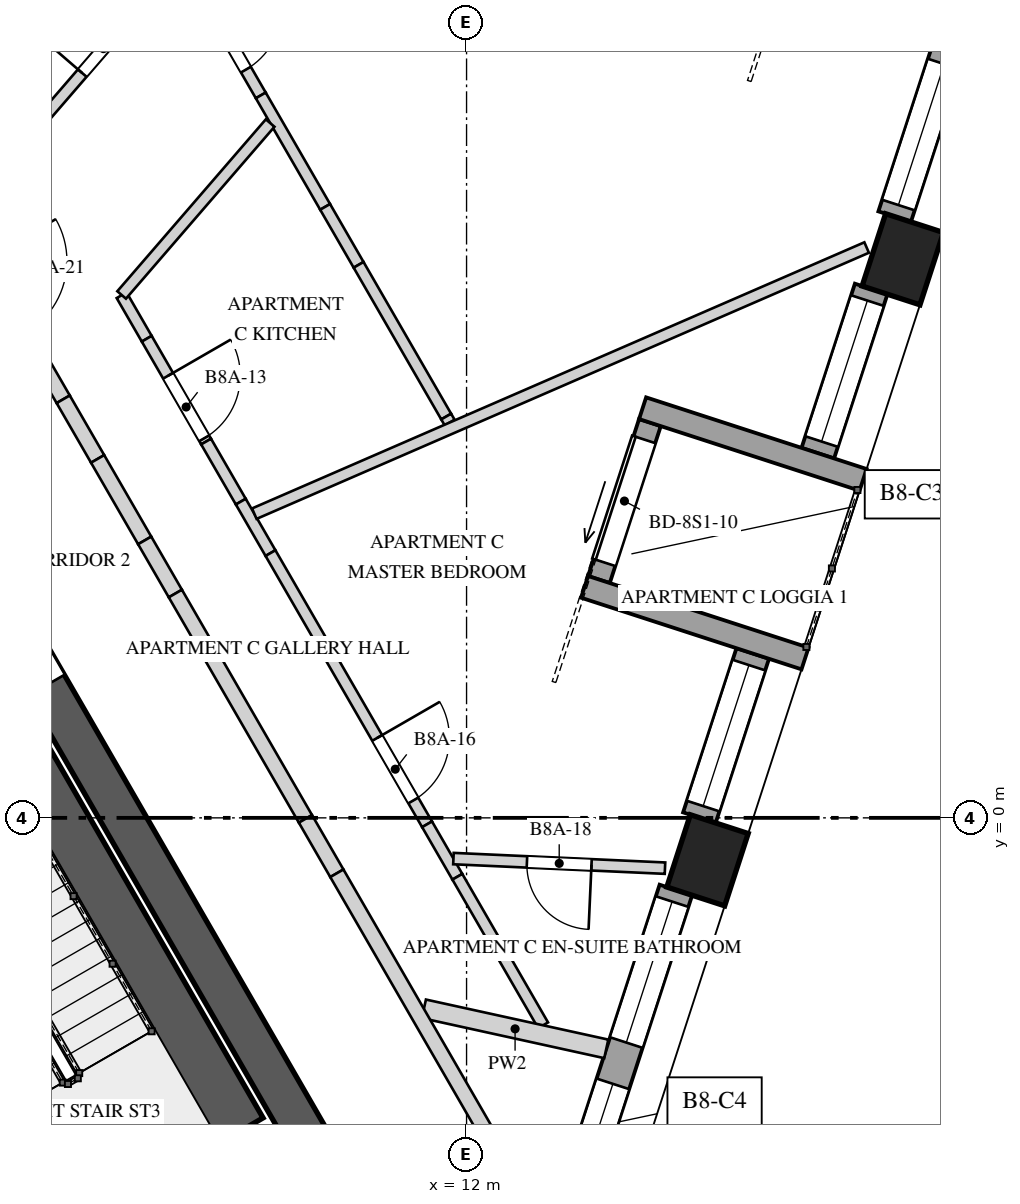
"""IFC4 building model, lengths in metres.
Left out: names, types, materials, properties, quantities, classifications, styles, units other than length and angle.
Written with IfcOpenShell. Run it as: python <this file> out.ifc"""

import sys

from ifc_helpers import new_model, si_unit, direction, frame, frame_2d, origin, origin_2d, place, context, subcontext, project, spatial, polyline, rectangle, outline, extrude, element, fill, save


model = new_model("IFC4")
c1 = context("Model", 3, precision=1e-05, world=origin(), true_north=direction((0.0, 1.0)))
c2 = subcontext(c1, "Body", "Model", "MODEL_VIEW")
j1 = project(units=[si_unit("LENGTHUNIT", "METRE"), si_unit("PLANEANGLEUNIT", "RADIAN")], contexts=[c1])
p1 = place(None, origin())
s1 = spatial("IfcSite", under=j1, at=p1, CompositionType="ELEMENT")
p2 = place(p1, origin())
s2 = spatial("IfcBuilding", under=s1, at=p2, CompositionType="ELEMENT")
p3 = place(p2, frame((0.0, 0.0, 320.4)))
s3 = spatial("IfcBuildingStorey", under=s2, at=p3, CompositionType="ELEMENT", Elevation=320.4)
p4 = place(p3, frame((8.566, -6.613, 0.0), z_axis=(0.0, 0.0, 1.0), x_axis=(0.499995765644, 0.866027848477, 0.0)))
e1 = element("IfcWall", 1, at=p4, inside=s3, PredefinedType="SHEAR", context=c2, shape_type="SweptSolid", body=[
    extrude(rectangle(XDim=2.887, YDim=0.55, at=frame_2d((1.443, 0.0))), origin(), (0.0, 0.0, 1.0), 4.0),
])
p5 = place(p3, frame((9.93, -4.25, 0.0), z_axis=(0.0, 0.0, 1.0), x_axis=(-0.499994590896, 0.86602852671, 0.0)))
e2 = element("IfcWall", 2, at=p5, inside=s3, PredefinedType="SHEAR", context=c2, shape_type="SweptSolid", body=[
    extrude(rectangle(XDim=17.292, YDim=0.55, at=frame_2d((8.646, 0.0))), origin(), (0.0, 0.0, 1.0), 4.0),
])
p6 = place(p5, frame((6.921, 0.0, 0.0)))
e3 = element("IfcOpeningElement", 3, at=p6, cuts=e2, PredefinedType="OPENING", context=c2, shape_type="SweptSolid", body=[
    extrude(rectangle(XDim=1.0, YDim=2.4, at=frame_2d((0.5, 1.2))), frame((0.0, 0.285, 0.0), z_axis=(0.0, -1.0, 0.0), x_axis=(1.0, 0.0, 0.0)), (0.0, 0.0, 1.0), 0.57),
])
for number, where, z_axis, x_axis in (
    (4, (15.17, -0.558, -0.35), (0.0, 0.0, 1.0), (0.309, 0.951, 0.0)),
    (5, (17.739, 7.349, -0.35), (0.0, 0.0, 1.0), (0.309, 0.951, 0.0)),
):
    element("IfcColumn", number, at=place(p3, frame(where, z_axis=z_axis, x_axis=x_axis)), inside=s3, PredefinedType="COLUMN", context=c2, shape_type="SweptSolid", body=[
        extrude(rectangle(XDim=1.0, YDim=0.8, at=origin_2d()), origin(), (0.0, 0.0, 1.0), 4.35),
    ])
p7 = place(p3, frame((12.494, -7.905, 0.0), z_axis=(0.0, 0.0, 1.0), x_axis=(0.309008326872, 0.951059332494, 0.0)))
e6 = element("IfcWall", 6, at=p7, inside=s3, PredefinedType="SOLIDWALL", context=c2, shape_type="SweptSolid", body=[
    extrude(rectangle(XDim=7.314, YDim=0.45, at=frame_2d((3.657, 0.0))), origin(), (0.0, 0.0, 1.0), 3.3),
])
p8 = place(p7, frame((0.161, 0.0, 0.4)))
e7 = element("IfcOpeningElement", 7, at=p8, cuts=e6, PredefinedType="OPENING", context=c2, shape_type="SweptSolid", body=[
    extrude(rectangle(XDim=1.95, YDim=2.75, at=frame_2d((0.975, 1.375))), frame((0.0, 0.235, 0.0), z_axis=(0.0, -1.0, 0.0), x_axis=(1.0, 0.0, 0.0)), (0.0, 0.0, 1.0), 0.47),
])
p9 = place(p7, frame((2.682, 0.0, 0.4)))
e8 = element("IfcOpeningElement", 8, at=p9, cuts=e6, PredefinedType="OPENING", context=c2, shape_type="SweptSolid", body=[
    extrude(rectangle(XDim=1.95, YDim=2.75, at=frame_2d((0.975, 1.375))), frame((0.0, 0.235, 0.0), z_axis=(0.0, -1.0, 0.0), x_axis=(1.0, 0.0, 0.0)), (0.0, 0.0, 1.0), 0.47),
])
p10 = place(p7, frame((5.203, 0.0, 0.4)))
e9 = element("IfcOpeningElement", 9, at=p10, cuts=e6, PredefinedType="OPENING", context=c2, shape_type="SweptSolid", body=[
    extrude(rectangle(XDim=1.95, YDim=2.75, at=frame_2d((0.975, 1.375))), frame((0.0, 0.235, 0.0), z_axis=(0.0, -1.0, 0.0), x_axis=(1.0, 0.0, 0.0)), (0.0, 0.0, 1.0), 0.47),
])
p11 = place(p3, frame((15.063, 0.002, 0.0), z_axis=(0.0, 0.0, 1.0), x_axis=(0.309059334219, 0.951042758204, 0.0)))
e10 = element("IfcWall", 10, at=p11, inside=s3, PredefinedType="SOLIDWALL", context=c2, shape_type="SweptSolid", body=[
    extrude(rectangle(XDim=2.271, YDim=0.45, at=frame_2d((1.135, 0.0))), origin(), (0.0, 0.0, 1.0), 3.3),
])
p12 = place(p11, frame((0.161, 0.0, 0.4)))
e11 = element("IfcOpeningElement", 11, at=p12, cuts=e10, PredefinedType="OPENING", context=c2, shape_type="SweptSolid", body=[
    extrude(rectangle(XDim=1.95, YDim=2.75, at=frame_2d((0.975, 1.375))), frame((0.0, 0.235, 0.0), z_axis=(0.0, -1.0, 0.0), x_axis=(1.0, 0.0, 0.0)), (0.0, 0.0, 1.0), 0.47),
])
p13 = place(p3, frame((16.621, 4.798, 0.0), z_axis=(0.0, 0.0, 1.0), x_axis=(0.309027740273, 0.951053024674, 0.0)))
e12 = element("IfcWall", 12, at=p13, inside=s3, PredefinedType="SOLIDWALL", context=c2, shape_type="SweptSolid", body=[
    extrude(rectangle(XDim=2.271, YDim=0.45, at=frame_2d((1.136, 0.0))), origin(), (0.0, 0.0, 1.0), 3.3),
])
p14 = place(p13, frame((0.161, 0.0, 0.4)))
e13 = element("IfcOpeningElement", 13, at=p14, cuts=e12, PredefinedType="OPENING", context=c2, shape_type="SweptSolid", body=[
    extrude(rectangle(XDim=1.95, YDim=2.1, at=frame_2d((0.975, 1.05))), frame((0.0, 0.235, 0.0), z_axis=(0.0, -1.0, 0.0), x_axis=(1.0, 0.0, 0.0)), (0.0, 0.0, 1.0), 0.47),
])
p15 = place(p3, frame((17.632, 7.909, 0.0), z_axis=(0.0, 0.0, 1.0), x_axis=(0.309027740273, 0.951053024674, 0.0)))
e14 = element("IfcWall", 14, at=p15, inside=s3, PredefinedType="SOLIDWALL", context=c2, shape_type="SweptSolid", body=[
    extrude(rectangle(XDim=2.271, YDim=0.45, at=frame_2d((1.136, 0.0))), origin(), (0.0, 0.0, 1.0), 3.3),
])
p16 = place(p15, frame((0.161, 0.0, 0.4)))
e15 = element("IfcOpeningElement", 15, at=p16, cuts=e14, PredefinedType="OPENING", context=c2, shape_type="SweptSolid", body=[
    extrude(rectangle(XDim=1.95, YDim=2.75, at=frame_2d((0.975, 1.375))), frame((0.0, 0.235, 0.0), z_axis=(0.0, -1.0, 0.0), x_axis=(1.0, 0.0, 0.0)), (0.0, 0.0, 1.0), 0.47),
])
p17 = place(p3, frame((13.741, 3.135, 0.0), z_axis=(0.0, 0.0, 1.0), x_axis=(0.308966581759, 0.95107289487, 0.0)))
e16 = element("IfcWall", 16, at=p17, inside=s3, PredefinedType="SOLIDWALL", context=c2, shape_type="SweptSolid", body=[
    extrude(rectangle(XDim=2.171, YDim=0.3, at=frame_2d((1.086, 0.0))), origin(), (0.0, 0.0, 1.0), 3.3),
])
p18 = place(p17, frame((0.236, 0.0, 0.0)))
e17 = element("IfcOpeningElement", 17, at=p18, cuts=e16, PredefinedType="OPENING", context=c2, shape_type="SweptSolid", body=[
    extrude(rectangle(XDim=1.7, YDim=2.5, at=frame_2d((0.85, 1.25))), frame((0.0, 0.16, 0.0), z_axis=(0.0, -1.0, 0.0), x_axis=(1.0, 0.0, 0.0)), (0.0, 0.0, 1.0), 0.32),
])
for number, where, z_axis, x_axis in (
    (18, (16.453, 2.096, 0.0), (0.0, 0.0, 1.0), (-0.951, 0.309, 0.0)),
    (19, (17.217, 4.447, 0.0), (0.0, 0.0, 1.0), (-0.951, 0.309, 0.0)),
    (20, (19.022, 10.003, 0.0), (0.0, 0.0, 1.0), (-0.951, 0.309, 0.0)),
):
    element("IfcWall", number, at=place(p3, frame(where, z_axis=z_axis, x_axis=x_axis)), inside=s3, PredefinedType="SOLIDWALL", context=c2, shape_type="SweptSolid", body=[
        extrude(rectangle(XDim=3.05, YDim=0.3, at=frame_2d((1.525, 0.0))), origin(), (0.0, 0.0, 1.0), 3.3),
    ])
p19 = place(p3, frame((8.998, -4.135, 0.0), z_axis=(0.0, 0.0, 1.0), x_axis=(-0.500009909098, 0.866019682689, 0.0)))
e21 = element("IfcWall", 21, at=p19, inside=s3, PredefinedType="SOLIDWALL", context=c2, shape_type="SweptSolid", body=[
    extrude(rectangle(XDim=6.2, YDim=0.75, at=frame_2d((3.1, 0.0))), origin(), (0.0, 0.0, 1.0), 3.65),
])
p20 = place(p3, frame((5.7, 10.078, 0.0), z_axis=(0.0, 0.0, 1.0), x_axis=(0.492280407927, 0.870436672005, 0.0)))
e22 = element("IfcWall", 22, at=p20, inside=s3, PredefinedType="PARTITIONING", context=c2, shape_type="SweptSolid", body=[
    extrude(rectangle(XDim=7.246, YDim=0.15, at=frame_2d((3.623, 0.0))), origin(), (0.0, 0.0, 1.0), 2.95),
])
p21 = place(p3, frame((6.246, 8.99, 0.0), z_axis=(0.0, 0.0, 1.0), x_axis=(0.653775215384, 0.756688818306, 0.0)))
e23 = element("IfcWall", 23, at=p21, inside=s3, PredefinedType="PARTITIONING", context=c2, shape_type="SweptSolid", body=[
    extrude(rectangle(XDim=2.987, YDim=0.15, at=frame_2d((1.493, 0.0))), origin(), (0.0, 0.0, 1.0), 3.65),
])
p22 = place(p21, frame((1.068, 0.0, 0.0)))
e24 = element("IfcOpeningElement", 24, at=p22, cuts=e23, PredefinedType="OPENING", context=c2, shape_type="SweptSolid", body=[
    extrude(rectangle(XDim=0.85, YDim=2.4, at=frame_2d((0.425, 1.2))), frame((0.0, 0.085, 0.0), z_axis=(0.0, -1.0, 0.0), x_axis=(1.0, 0.0, 0.0)), (0.0, 0.0, 1.0), 0.17),
])
p23 = place(p3, frame((8.597, 10.71, 0.0), z_axis=(0.0, 0.0, 1.0), x_axis=(0.499950230578, -0.866054136267, 0.0)))
e25 = element("IfcWall", 25, at=p23, inside=s3, PredefinedType="PARTITIONING", context=c2, shape_type="SweptSolid", body=[
    extrude(outline(polyline([(0.0, 0.0), (1.392, 0.0), (1.392, 2.55), (0.474, 2.55), (0.474, 3.65), (0.0, 3.65), (0.0, 0.0)])), frame((0.0, 0.075, 0.0), z_axis=(0.0, -1.0, 0.0), x_axis=(1.0, 0.0, 0.0)), (0.0, 0.0, 1.0), 0.15),
])
p24 = place(p23, frame((0.05, 0.0, 0.0)))
e26 = element("IfcOpeningElement", 26, at=p24, cuts=e25, PredefinedType="OPENING", context=c2, shape_type="SweptSolid", body=[
    extrude(rectangle(XDim=0.95, YDim=2.4, at=frame_2d((0.475, 1.2))), frame((0.0, 0.085, 0.0), z_axis=(0.0, -1.0, 0.0), x_axis=(1.0, 0.0, 0.0)), (0.0, 0.0, 1.0), 0.17),
])
p25 = place(p3, frame((9.293, 9.504, 0.0), z_axis=(0.0, 0.0, 1.0), x_axis=(0.500046963369, -0.865998287773, 0.0)))
e27 = element("IfcWall", 27, at=p25, inside=s3, PredefinedType="PARTITIONING", context=c2, shape_type="SweptSolid", body=[
    extrude(rectangle(XDim=1.693, YDim=0.15, at=frame_2d((0.847, 0.0))), origin(), (0.0, 0.0, 1.0), 3.65),
])
p26 = place(p3, frame((10.139, 8.038, 0.0), z_axis=(0.0, 0.0, 1.0), x_axis=(0.499866452165, -0.866102493935, 0.0)))
e28 = element("IfcWall", 28, at=p26, inside=s3, PredefinedType="PARTITIONING", context=c2, shape_type="SweptSolid", body=[
    extrude(rectangle(XDim=0.881, YDim=0.15, at=frame_2d((0.44, 0.0))), origin(), (0.0, 0.0, 1.0), 2.55),
])
p27 = place(p3, frame((10.58, 7.275, 0.0), z_axis=(0.0, 0.0, 1.0), x_axis=(0.500012835235, -0.866017993231, 0.0)))
e29 = element("IfcWall", 29, at=p27, inside=s3, PredefinedType="PARTITIONING", context=c2, shape_type="SweptSolid", body=[
    extrude(rectangle(XDim=2.305, YDim=0.15, at=frame_2d((1.152, 0.0))), origin(), (0.0, 0.0, 1.0), 3.65),
])
p28 = place(p3, frame((11.732, 5.28, 0.0), z_axis=(0.0, 0.0, 1.0), x_axis=(0.501036270542, -0.865426285481, 0.0)))
e30 = element("IfcWall", 30, at=p28, inside=s3, PredefinedType="PARTITIONING", context=c2, shape_type="SweptSolid", body=[
    extrude(rectangle(XDim=0.091, YDim=0.15, at=frame_2d((0.045, 0.0))), origin(), (0.0, 0.0, 1.0), 2.75),
])
p29 = place(p3, frame((7.462, 6.876, 0.0), z_axis=(0.0, 0.0, 1.0), x_axis=(0.499914360624, -0.866074842056, 0.0)))
e31 = element("IfcWall", 31, at=p29, inside=s3, PredefinedType="PARTITIONING", context=c2, shape_type="SweptSolid", body=[
    extrude(rectangle(XDim=0.661, YDim=0.15, at=frame_2d((0.33, 0.0))), origin(), (0.0, 0.0, 1.0), 3.65),
])
p30 = place(p3, frame((7.792, 6.303, 0.0), z_axis=(0.0, 0.0, 1.0), x_axis=(0.50003806587, -0.866003425329, 0.0)))
e32 = element("IfcWall", 32, at=p30, inside=s3, PredefinedType="PARTITIONING", context=c2, shape_type="SweptSolid", body=[
    extrude(outline(polyline([(0.0, 0.0), (1.562, 0.0), (1.562, 3.65), (0.881, 3.65), (0.881, 2.55), (0.0, 2.55), (0.0, 0.0)])), frame((0.0, 0.075, 0.0), z_axis=(0.0, -1.0, 0.0), x_axis=(1.0, 0.0, 0.0)), (0.0, 0.0, 1.0), 0.15),
])
p31 = place(p30, frame((0.562, 0.0, 0.0)))
e33 = element("IfcOpeningElement", 33, at=p31, cuts=e32, PredefinedType="OPENING", context=c2, shape_type="SweptSolid", body=[
    extrude(rectangle(XDim=0.95, YDim=2.4, at=frame_2d((0.475, 1.2))), frame((0.0, 0.085, 0.0), z_axis=(0.0, -1.0, 0.0), x_axis=(1.0, 0.0, 0.0)), (0.0, 0.0, 1.0), 0.17),
])
p32 = place(p3, frame((8.573, 4.95, 0.0), z_axis=(0.0, 0.0, 1.0), x_axis=(0.500023511883, -0.866011828767, 0.0)))
e34 = element("IfcWall", 34, at=p32, inside=s3, PredefinedType="PARTITIONING", context=c2, shape_type="SweptSolid", body=[
    extrude(rectangle(XDim=0.913, YDim=0.15, at=frame_2d((0.456, 0.0))), origin(), (0.0, 0.0, 1.0), 3.65),
])
p33 = place(p3, frame((9.03, 4.16, 0.0), z_axis=(0.0, 0.0, 1.0), x_axis=(0.499767520639, -0.866159584207, 0.0)))
e35 = element("IfcWall", 35, at=p33, inside=s3, PredefinedType="PARTITIONING", context=c2, shape_type="SweptSolid", body=[
    extrude(rectangle(XDim=0.781, YDim=0.15, at=frame_2d((0.391, 0.0))), origin(), (0.0, 0.0, 1.0), 2.75),
])
p34 = place(p3, frame((9.42, 3.483, 0.0), z_axis=(0.0, 0.0, 1.0), x_axis=(0.50002680699, -0.866009926209, 0.0)))
e36 = element("IfcWall", 36, at=p34, inside=s3, PredefinedType="PARTITIONING", context=c2, shape_type="SweptSolid", body=[
    extrude(rectangle(XDim=4.12, YDim=0.15, at=frame_2d((2.06, 0.0))), origin(), (0.0, 0.0, 1.0), 3.65),
])
p35 = place(p34, frame((2.808, 0.0, 0.0)))
e37 = element("IfcOpeningElement", 37, at=p35, cuts=e36, PredefinedType="OPENING", context=c2, shape_type="SweptSolid", body=[
    extrude(rectangle(XDim=0.95, YDim=2.4, at=frame_2d((0.475, 1.2))), frame((0.0, 0.085, 0.0), z_axis=(0.0, -1.0, 0.0), x_axis=(1.0, 0.0, 0.0)), (0.0, 0.0, 1.0), 0.17),
])
p36 = place(p3, frame((11.48, -0.085, 0.0), z_axis=(0.0, 0.0, 1.0), x_axis=(0.499961121316, -0.86604784924, 0.0)))
e38 = element("IfcWall", 38, at=p36, inside=s3, PredefinedType="PARTITIONING", context=c2, shape_type="SweptSolid", body=[
    extrude(rectangle(XDim=0.797, YDim=0.15, at=frame_2d((0.398, 0.0))), origin(), (0.0, 0.0, 1.0), 2.95),
])
p37 = place(p3, frame((11.879, -0.775, 0.0), z_axis=(0.0, 0.0, 1.0), x_axis=(0.50003780229, -0.866003577522, 0.0)))
e39 = element("IfcWall", 39, at=p37, inside=s3, PredefinedType="PARTITIONING", context=c2, shape_type="SweptSolid", body=[
    extrude(rectangle(XDim=2.256, YDim=0.15, at=frame_2d((1.128, 0.0))), origin(), (0.0, 0.0, 1.0), 3.65),
])
p38 = place(p3, frame((9.416, 9.141, 0.0), z_axis=(0.0, 0.0, 1.0), x_axis=(-0.653726199584, -0.756731164931, 0.0)))
e40 = element("IfcWall", 40, at=p38, inside=s3, PredefinedType="PARTITIONING", context=c2, shape_type="SweptSolid", body=[
    extrude(rectangle(XDim=2.989, YDim=0.15, at=frame_2d((1.494, 0.0))), origin(), (0.0, 0.0, 1.0), 3.65),
])
p39 = place(p3, frame((11.439, -2.512, 0.0), z_axis=(0.0, 0.0, 1.0), x_axis=(0.976726571075, -0.2144882406, 0.0)))
e41 = element("IfcWall", 41, at=p39, inside=s3, PredefinedType="SOLIDWALL", context=c2, shape_type="SweptSolid", body=[
    extrude(rectangle(XDim=2.456, YDim=0.25, at=frame_2d((1.228, 0.0))), origin(), (0.0, 0.0, 1.0), 3.65),
])
p40 = place(p3, frame((14.611, -0.662, 0.0), z_axis=(0.0, 0.0, 1.0), x_axis=(-0.998973232514, 0.045304312387, 0.0)))
e42 = element("IfcWall", 42, at=p40, inside=s3, PredefinedType="PARTITIONING", context=c2, shape_type="SweptSolid", body=[
    extrude(rectangle(XDim=2.786, YDim=0.15, at=frame_2d((1.393, 0.0))), origin(), (0.0, 0.0, 1.0), 2.95),
])
p41 = place(p40, frame((0.968, 0.0, 0.0)))
e43 = element("IfcOpeningElement", 43, at=p41, cuts=e42, PredefinedType="OPENING", context=c2, shape_type="SweptSolid", body=[
    extrude(rectangle(XDim=0.85, YDim=2.4, at=frame_2d((0.425, 1.2))), frame((0.0, 0.085, 0.0), z_axis=(0.0, -1.0, 0.0), x_axis=(1.0, 0.0, 0.0)), (0.0, 0.0, 1.0), 0.17),
])
p42 = place(p3, frame((17.263, 7.503, 0.0), z_axis=(0.0, 0.0, 1.0), x_axis=(-0.917126165883, -0.398597034425, 0.0)))
e44 = element("IfcWall", 44, at=p42, inside=s3, PredefinedType="PARTITIONING", context=c2, shape_type="SweptSolid", body=[
    extrude(rectangle(XDim=8.784, YDim=0.15, at=frame_2d((4.392, 0.0))), origin(), (0.0, 0.0, 1.0), 2.75),
])
p43 = place(p3, frame((6.29, 6.205, 0.0), z_axis=(0.0, 0.0, 1.0), x_axis=(0.500045602705, -0.86599907345, 0.0)))
e45 = element("IfcWall", 45, at=p43, inside=s3, PredefinedType="SOLIDWALL", context=c2, shape_type="SweptSolid", body=[
    extrude(rectangle(XDim=0.807, YDim=0.2, at=frame_2d((0.403, 0.0))), origin(), (0.0, 0.0, 1.0), 3.65),
])
p44 = place(p3, frame((6.693, 5.507, 0.0), z_axis=(0.0, 0.0, 1.0), x_axis=(0.499994660107, -0.866028486751, 0.0)))
e46 = element("IfcWall", 46, at=p44, inside=s3, PredefinedType="SOLIDWALL", context=c2, shape_type="SweptSolid", body=[
    extrude(rectangle(XDim=0.906, YDim=0.2, at=frame_2d((0.453, 0.0))), origin(), (0.0, 0.0, 1.0), 2.55),
])
p45 = place(p3, frame((7.146, 4.722, 0.0), z_axis=(0.0, 0.0, 1.0), x_axis=(0.499955681623, -0.866050989499, 0.0)))
e47 = element("IfcWall", 47, at=p45, inside=s3, PredefinedType="SOLIDWALL", context=c2, shape_type="SweptSolid", body=[
    extrude(rectangle(XDim=1.238, YDim=0.2, at=frame_2d((0.619, 0.0))), origin(), (0.0, 0.0, 1.0), 3.65),
])
p46 = place(p3, frame((7.765, 3.65, 0.0), z_axis=(0.0, 0.0, 1.0), x_axis=(0.500141487433, -0.865943700565, 0.0)))
e48 = element("IfcWall", 48, at=p46, inside=s3, PredefinedType="SOLIDWALL", context=c2, shape_type="SweptSolid", body=[
    extrude(rectangle(XDim=0.807, YDim=0.2, at=frame_2d((0.403, 0.0))), origin(), (0.0, 0.0, 1.0), 2.75),
])
p47 = place(p3, frame((8.169, 2.951, 0.0), z_axis=(0.0, 0.0, 1.0), x_axis=(0.499959115548, -0.866049007147, 0.0)))
e49 = element("IfcWall", 49, at=p47, inside=s3, PredefinedType="SOLIDWALL", context=c2, shape_type="SweptSolid", body=[
    extrude(rectangle(XDim=3.423, YDim=0.2, at=frame_2d((1.711, 0.0))), origin(), (0.0, 0.0, 1.0), 3.65),
])
p48 = place(p3, frame((9.88, -0.013, 0.0), z_axis=(0.0, 0.0, 1.0), x_axis=(0.499952654668, -0.866052736899, 0.0)))
e50 = element("IfcWall", 50, at=p48, inside=s3, PredefinedType="SOLIDWALL", context=c2, shape_type="SweptSolid", body=[
    extrude(rectangle(XDim=0.826, YDim=0.2, at=frame_2d((0.413, 0.0))), origin(), (0.0, 0.0, 1.0), 2.95),
])
p49 = place(p3, frame((10.293, -0.729, 0.0), z_axis=(0.0, 0.0, 1.0), x_axis=(0.50002046505, -0.86601358796, 0.0)))
e51 = element("IfcWall", 51, at=p49, inside=s3, PredefinedType="SOLIDWALL", context=c2, shape_type="SweptSolid", body=[
    extrude(rectangle(XDim=4.066, YDim=0.2, at=frame_2d((2.033, 0.0))), origin(), (0.0, 0.0, 1.0), 3.65),
])
p50 = place(p9, origin())
e52 = element("IfcWindow", 52, at=p50, inside=s3, PartitioningType="SINGLE_PANEL", PredefinedType="WINDOW", context=c2, shape_type="SweptSolid", body=[
    extrude(rectangle(XDim=1.95, YDim=2.75, at=frame_2d((0.975, 1.375))), frame((0.0, 0.03, 0.0), z_axis=(0.0, -1.0, 0.0), x_axis=(1.0, 0.0, 0.0)), (0.0, 0.0, 1.0), 0.06),
])
fill(e8, e52)
p51 = place(p10, origin())
e53 = element("IfcWindow", 53, at=p51, inside=s3, PartitioningType="SINGLE_PANEL", PredefinedType="WINDOW", context=c2, shape_type="SweptSolid", body=[
    extrude(rectangle(XDim=1.95, YDim=2.75, at=frame_2d((0.975, 1.375))), frame((0.0, 0.03, 0.0), z_axis=(0.0, -1.0, 0.0), x_axis=(1.0, 0.0, 0.0)), (0.0, 0.0, 1.0), 0.06),
])
fill(e9, e53)
p52 = place(p12, origin())
e54 = element("IfcWindow", 54, at=p52, inside=s3, PartitioningType="SINGLE_PANEL", PredefinedType="WINDOW", context=c2, shape_type="SweptSolid", body=[
    extrude(rectangle(XDim=1.95, YDim=2.75, at=frame_2d((0.975, 1.375))), frame((0.0, 0.03, 0.0), z_axis=(0.0, -1.0, 0.0), x_axis=(1.0, 0.0, 0.0)), (0.0, 0.0, 1.0), 0.06),
])
fill(e11, e54)
p53 = place(p14, origin())
e55 = element("IfcWindow", 55, at=p53, inside=s3, PartitioningType="SINGLE_PANEL", PredefinedType="WINDOW", context=c2, shape_type="SweptSolid", body=[
    extrude(rectangle(XDim=1.95, YDim=2.1, at=frame_2d((0.975, 1.05))), frame((0.0, 0.03, 0.0), z_axis=(0.0, -1.0, 0.0), x_axis=(1.0, 0.0, 0.0)), (0.0, 0.0, 1.0), 0.06),
])
fill(e13, e55)
p54 = place(p16, origin())
e56 = element("IfcWindow", 56, at=p54, inside=s3, PartitioningType="SINGLE_PANEL", PredefinedType="WINDOW", context=c2, shape_type="SweptSolid", body=[
    extrude(rectangle(XDim=1.95, YDim=2.75, at=frame_2d((0.975, 1.375))), frame((0.0, 0.03, 0.0), z_axis=(0.0, -1.0, 0.0), x_axis=(1.0, 0.0, 0.0)), (0.0, 0.0, 1.0), 0.06),
])
fill(e15, e56)
p55 = place(p18, origin())
e57 = element("IfcDoor", 57, at=p55, inside=s3, OperationType="SLIDING_TO_LEFT", PredefinedType="DOOR", context=c2, shape_type="SweptSolid", body=[
    extrude(rectangle(XDim=1.7, YDim=2.5, at=frame_2d((0.85, 1.25))), frame((0.0, 0.025, 0.0), z_axis=(0.0, -1.0, 0.0), x_axis=(1.0, 0.0, 0.0)), (0.0, 0.0, 1.0), 0.05),
])
fill(e17, e57)
p56 = place(p31, origin())
e58 = element("IfcDoor", 58, at=p56, inside=s3, OperationType="SINGLE_SWING_LEFT", PredefinedType="DOOR", context=c2, shape_type="SweptSolid", body=[
    extrude(rectangle(XDim=0.95, YDim=2.4, at=frame_2d((0.475, 1.2))), frame((0.0, 0.025, 0.0), z_axis=(0.0, -1.0, 0.0), x_axis=(1.0, 0.0, 0.0)), (0.0, 0.0, 1.0), 0.05),
])
fill(e33, e58)
p57 = place(p22, origin())
e59 = element("IfcDoor", 59, at=p57, inside=s3, OperationType="SINGLE_SWING_RIGHT", PredefinedType="DOOR", context=c2, shape_type="SweptSolid", body=[
    extrude(rectangle(XDim=0.85, YDim=2.4, at=frame_2d((0.425, 1.2))), frame((0.0, 0.025, 0.0), z_axis=(0.0, -1.0, 0.0), x_axis=(1.0, 0.0, 0.0)), (0.0, 0.0, 1.0), 0.05),
])
fill(e24, e59)
p58 = place(p24, origin())
e60 = element("IfcDoor", 60, at=p58, inside=s3, OperationType="SINGLE_SWING_LEFT", PredefinedType="DOOR", context=c2, shape_type="SweptSolid", body=[
    extrude(rectangle(XDim=0.95, YDim=2.4, at=frame_2d((0.475, 1.2))), frame((0.0, 0.025, 0.0), z_axis=(0.0, -1.0, 0.0), x_axis=(1.0, 0.0, 0.0)), (0.0, 0.0, 1.0), 0.05),
])
fill(e26, e60)
p59 = place(p35, origin())
e61 = element("IfcDoor", 61, at=p59, inside=s3, OperationType="SINGLE_SWING_RIGHT", PredefinedType="DOOR", context=c2, shape_type="SweptSolid", body=[
    extrude(rectangle(XDim=0.95, YDim=2.4, at=frame_2d((0.475, 1.2))), frame((0.0, 0.025, 0.0), z_axis=(0.0, -1.0, 0.0), x_axis=(1.0, 0.0, 0.0)), (0.0, 0.0, 1.0), 0.05),
])
fill(e37, e61)
p60 = place(p41, origin())
e62 = element("IfcDoor", 62, at=p60, inside=s3, OperationType="SINGLE_SWING_RIGHT", PredefinedType="DOOR", context=c2, shape_type="SweptSolid", body=[
    extrude(rectangle(XDim=0.85, YDim=2.4, at=frame_2d((0.425, 1.2))), frame((0.0, 0.025, 0.0), z_axis=(0.0, -1.0, 0.0), x_axis=(1.0, 0.0, 0.0)), (0.0, 0.0, 1.0), 0.05),
])
fill(e43, e62)
save(model, sys.argv[1])
